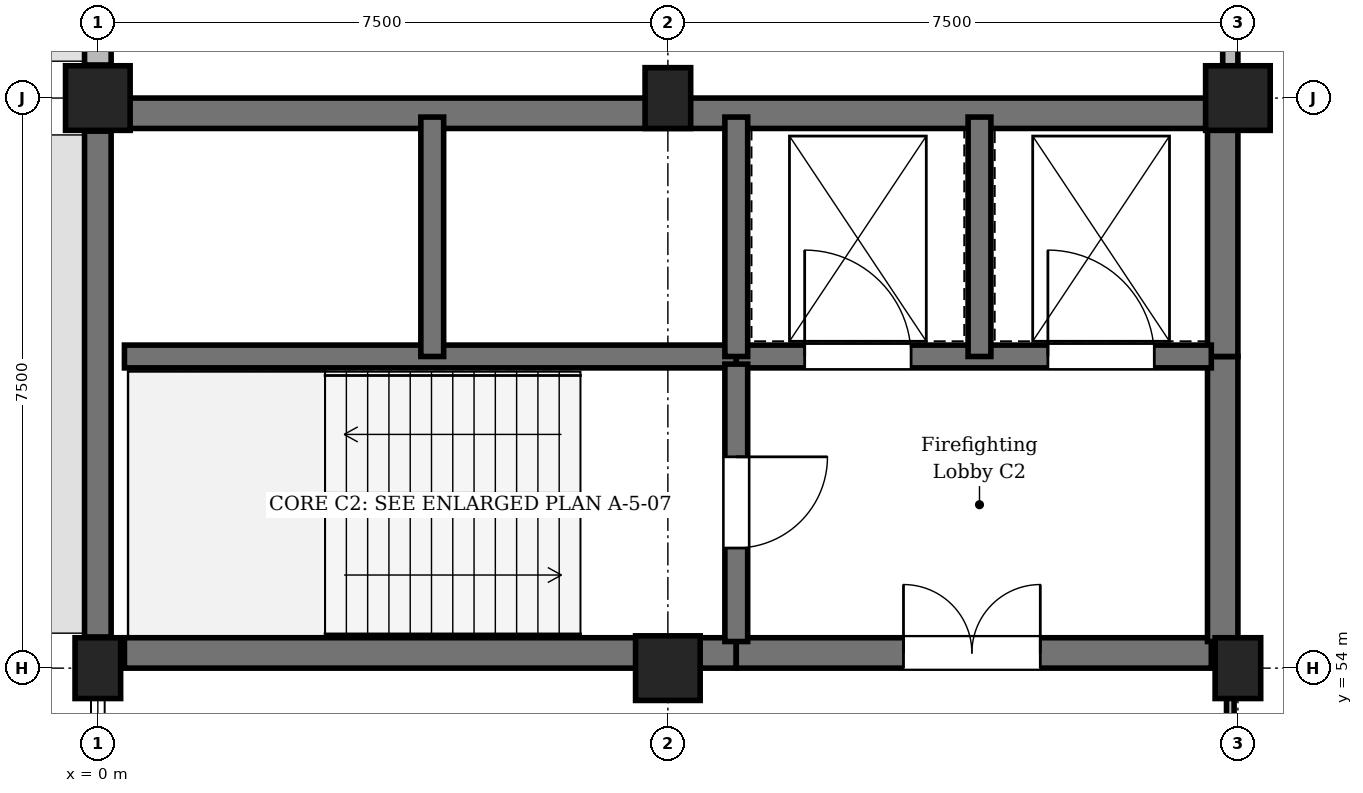
"""IFC4 building model, lengths in metres.
Left out: names, types, materials, properties, quantities, classifications, styles, units other than length and angle.
Written with IfcOpenShell. Run it as: python <this file> out.ifc"""

import sys

from ifc_helpers import new_model, si_unit, direction, frame, frame_2d, origin, origin_2d, place, context, subcontext, project, spatial, rectangle, extrude, element, fill, save


model = new_model("IFC4")
c1 = context("Model", 3, precision=1e-05, world=origin(), true_north=direction((0.0, 1.0)))
c2 = subcontext(c1, "Body", "Model", "MODEL_VIEW")
j1 = project(units=[si_unit("LENGTHUNIT", "METRE"), si_unit("PLANEANGLEUNIT", "RADIAN")], contexts=[c1])
p1 = place(None, origin())
s1 = spatial("IfcSite", under=j1, at=p1, CompositionType="ELEMENT")
p2 = place(p1, origin())
s2 = spatial("IfcBuilding", under=s1, at=p2, CompositionType="ELEMENT")
p3 = place(p2, frame((0.0, 0.0, 4.8)))
s3 = spatial("IfcBuildingStorey", under=s2, at=p3, CompositionType="ELEMENT", Elevation=4.8)
p4 = place(p3, frame((0.0, 54.0, 0.0), z_axis=(0.0, 0.0, 1.0), x_axis=(1.0, 0.0, 0.0)))
e1 = element("IfcColumn", 1, at=p4, inside=s3, PredefinedType="COLUMN", context=c2, shape_type="SweptSolid", body=[
    extrude(rectangle(XDim=0.6, YDim=0.8, at=origin_2d()), origin(), (0.0, 0.0, 1.0), 4.5),
])
for number, where, z_axis, x_axis in (
    (2, (0.0, 61.5, 0.0), (0.0, 0.0, 1.0), (1.0, 0.0, 0.0)),
    (3, (7.5, 54.0, 0.0), (0.0, 0.0, 1.0), (1.0, 0.0, 0.0)),
):
    element("IfcColumn", number, at=place(p3, frame(where, z_axis=z_axis, x_axis=x_axis)), inside=s3, PredefinedType="COLUMN", context=c2, shape_type="SweptSolid", body=[
        extrude(rectangle(XDim=0.85, YDim=0.85, at=origin_2d()), origin(), (0.0, 0.0, 1.0), 4.5),
    ])
for number, where, z_axis, x_axis in (
    (4, (7.5, 61.5, 0.0), (0.0, 0.0, 1.0), (1.0, 0.0, 0.0)),
    (5, (15.0, 54.0, 0.0), (0.0, 0.0, 1.0), (1.0, 0.0, 0.0)),
):
    element("IfcColumn", number, at=place(p3, frame(where, z_axis=z_axis, x_axis=x_axis)), inside=s3, PredefinedType="COLUMN", context=c2, shape_type="SweptSolid", body=[
        extrude(rectangle(XDim=0.6, YDim=0.8, at=origin_2d()), origin(), (0.0, 0.0, 1.0), 4.5),
    ])
p5 = place(p3, frame((15.0, 61.5, 0.0), z_axis=(0.0, 0.0, 1.0), x_axis=(1.0, 0.0, 0.0)))
e6 = element("IfcColumn", 6, at=p5, inside=s3, PredefinedType="COLUMN", context=c2, shape_type="SweptSolid", body=[
    extrude(rectangle(XDim=0.85, YDim=0.85, at=origin_2d()), origin(), (0.0, 0.0, 1.0), 4.5),
])
p6 = place(p3, frame((0.0, 54.41, 0.0), z_axis=(0.0, 0.0, 1.0), x_axis=(0.0, 1.0, 0.0)))
e7 = element("IfcWall", 7, at=p6, inside=s3, PredefinedType="SHEAR", context=c2, shape_type="SweptSolid", body=[
    extrude(rectangle(XDim=6.655, YDim=0.35, at=frame_2d((3.328, 0.0))), origin(), (0.0, 0.0, 1.0), 4.18),
])
p7 = place(p3, frame((0.0, 61.935, 0.0), z_axis=(0.0, 0.0, 1.0), x_axis=(0.0, 1.0, 0.0)))
e8 = element("IfcWall", 8, at=p7, inside=s3, PredefinedType="STANDARD", context=c2, shape_type="SweptSolid", body=[
    extrude(rectangle(XDim=6.655, YDim=0.35, at=frame_2d((3.328, 0.0))), origin(), (0.0, 0.0, 1.0), 3.63),
])
p8 = place(p7, frame((2.327, 0.0, 0.9)))
e9 = element("IfcOpeningElement", 9, at=p8, cuts=e8, PredefinedType="OPENING", context=c2, shape_type="SweptSolid", body=[
    extrude(rectangle(XDim=2.0, YDim=1.95, at=frame_2d((1.0, 0.975))), frame((0.0, 0.185, 0.0), z_axis=(0.0, -1.0, 0.0), x_axis=(1.0, 0.0, 0.0)), (0.0, 0.0, 1.0), 0.37),
])
p9 = place(p3, frame((0.35, 54.2, 0.0), z_axis=(0.0, 0.0, 1.0), x_axis=(1.0, 0.0, 0.0)))
e10 = element("IfcWall", 10, at=p9, inside=s3, PredefinedType="SHEAR", context=c2, shape_type="SweptSolid", body=[
    extrude(rectangle(XDim=8.05, YDim=0.4, at=frame_2d((4.025, 0.0))), origin(), (0.0, 0.0, 1.0), 4.18),
])
p10 = place(p3, frame((8.4, 54.2, 0.0), z_axis=(0.0, 0.0, 1.0), x_axis=(1.0, 0.0, 0.0)))
e11 = element("IfcWall", 11, at=p10, inside=s3, PredefinedType="SHEAR", context=c2, shape_type="SweptSolid", body=[
    extrude(rectangle(XDim=6.25, YDim=0.4, at=frame_2d((3.125, 0.0))), origin(), (0.0, 0.0, 1.0), 4.18),
])
p11 = place(p10, frame((2.2, 0.0, 0.0)))
e12 = element("IfcOpeningElement", 12, at=p11, cuts=e11, PredefinedType="OPENING", context=c2, shape_type="SweptSolid", body=[
    extrude(rectangle(XDim=1.8, YDim=2.25, at=frame_2d((0.9, 1.125))), frame((0.0, 0.21, 0.0), z_axis=(0.0, -1.0, 0.0), x_axis=(1.0, 0.0, 0.0)), (0.0, 0.0, 1.0), 0.42),
])
p12 = place(p3, frame((0.35, 61.3, 0.0), z_axis=(0.0, 0.0, 1.0), x_axis=(1.0, 0.0, 0.0)))
e13 = element("IfcWall", 13, at=p12, inside=s3, PredefinedType="SHEAR", context=c2, shape_type="SweptSolid", body=[
    extrude(rectangle(XDim=14.3, YDim=0.4, at=frame_2d((7.15, 0.0))), origin(), (0.0, 0.0, 1.0), 4.18),
])
p13 = place(p3, frame((14.8, 54.35, 0.0), z_axis=(0.0, 0.0, 1.0), x_axis=(0.0, 1.0, 0.0)))
e14 = element("IfcWall", 14, at=p13, inside=s3, PredefinedType="SHEAR", context=c2, shape_type="SweptSolid", body=[
    extrude(rectangle(XDim=3.75, YDim=0.4, at=frame_2d((1.875, 0.0))), origin(), (0.0, 0.0, 1.0), 4.18),
])
p14 = place(p3, frame((14.8, 58.1, 0.0), z_axis=(0.0, 0.0, 1.0), x_axis=(0.0, 1.0, 0.0)))
e15 = element("IfcWall", 15, at=p14, inside=s3, PredefinedType="SHEAR", context=c2, shape_type="SweptSolid", body=[
    extrude(rectangle(XDim=3.05, YDim=0.4, at=frame_2d((1.525, 0.0))), origin(), (0.0, 0.0, 1.0), 4.18),
])
p15 = place(p3, frame((0.35, 58.1, 0.0), z_axis=(0.0, 0.0, 1.0), x_axis=(1.0, 0.0, 0.0)))
e16 = element("IfcWall", 16, at=p15, inside=s3, PredefinedType="SHEAR", context=c2, shape_type="SweptSolid", body=[
    extrude(rectangle(XDim=8.05, YDim=0.3, at=frame_2d((4.025, 0.0))), origin(), (0.0, 0.0, 1.0), 4.18),
])
p16 = place(p3, frame((8.4, 58.1, 0.0), z_axis=(0.0, 0.0, 1.0), x_axis=(1.0, 0.0, 0.0)))
e17 = element("IfcWall", 17, at=p16, inside=s3, PredefinedType="SHEAR", context=c2, shape_type="SweptSolid", body=[
    extrude(rectangle(XDim=6.25, YDim=0.3, at=frame_2d((3.125, 0.0))), origin(), (0.0, 0.0, 1.0), 4.18),
])
p17 = place(p16, frame((0.9, 0.0, 0.0)))
e18 = element("IfcOpeningElement", 18, at=p17, cuts=e17, PredefinedType="OPENING", context=c2, shape_type="SweptSolid", body=[
    extrude(rectangle(XDim=1.4, YDim=2.25, at=frame_2d((0.7, 1.125))), frame((0.0, 0.16, 0.0), z_axis=(0.0, -1.0, 0.0), x_axis=(1.0, 0.0, 0.0)), (0.0, 0.0, 1.0), 0.32),
])
p18 = place(p16, frame((4.1, 0.0, 0.0)))
e19 = element("IfcOpeningElement", 19, at=p18, cuts=e17, PredefinedType="OPENING", context=c2, shape_type="SweptSolid", body=[
    extrude(rectangle(XDim=1.4, YDim=2.25, at=frame_2d((0.7, 1.125))), frame((0.0, 0.16, 0.0), z_axis=(0.0, -1.0, 0.0), x_axis=(1.0, 0.0, 0.0)), (0.0, 0.0, 1.0), 0.32),
])
p19 = place(p3, frame((8.4, 58.0, 0.0), z_axis=(0.0, 0.0, 1.0), x_axis=(0.0, -1.0, 0.0)))
e20 = element("IfcWall", 20, at=p19, inside=s3, PredefinedType="SHEAR", context=c2, shape_type="SweptSolid", body=[
    extrude(rectangle(XDim=3.65, YDim=0.3, at=frame_2d((1.825, 0.0))), origin(), (0.0, 0.0, 1.0), 4.18),
])
p20 = place(p19, frame((1.22, 0.0, 0.0)))
e21 = element("IfcOpeningElement", 21, at=p20, cuts=e20, PredefinedType="OPENING", context=c2, shape_type="SweptSolid", body=[
    extrude(rectangle(XDim=1.2, YDim=2.25, at=frame_2d((0.6, 1.125))), frame((0.0, 0.16, 0.0), z_axis=(0.0, -1.0, 0.0), x_axis=(1.0, 0.0, 0.0)), (0.0, 0.0, 1.0), 0.32),
])
for number, where, z_axis, x_axis in (
    (22, (4.4, 58.1, 0.0), (0.0, 0.0, 1.0), (0.0, 1.0, 0.0)),
    (23, (8.4, 58.1, 0.0), (0.0, 0.0, 1.0), (0.0, 1.0, 0.0)),
    (24, (11.6, 58.1, 0.0), (0.0, 0.0, 1.0), (0.0, 1.0, 0.0)),
):
    element("IfcWall", number, at=place(p3, frame(where, z_axis=z_axis, x_axis=x_axis)), inside=s3, PredefinedType="SHEAR", context=c2, shape_type="SweptSolid", body=[
        extrude(rectangle(XDim=3.15, YDim=0.3, at=frame_2d((1.575, 0.0))), origin(), (0.0, 0.0, 1.0), 4.18),
    ])
p21 = place(p3, frame((14.9, 34.8, 0.0), z_axis=(0.0, 0.0, 1.0), x_axis=(0.0, 1.0, 0.0)))
e25 = element("IfcWall", 25, at=p21, inside=s3, PredefinedType="PARTITIONING", context=c2, shape_type="SweptSolid", body=[
    extrude(rectangle(XDim=18.9, YDim=0.1, at=frame_2d((9.45, 0.0))), origin(), (0.0, 0.0, 1.0), 3.565),
])
p22 = place(p21, frame((7.19, 0.0, 0.0)))
e26 = element("IfcOpeningElement", 26, at=p22, cuts=e25, PredefinedType="OPENING", context=c2, shape_type="SweptSolid", body=[
    extrude(rectangle(XDim=1.05, YDim=2.2, at=frame_2d((0.525, 1.1))), frame((0.0, 0.06, 0.0), z_axis=(0.0, -1.0, 0.0), x_axis=(1.0, 0.0, 0.0)), (0.0, 0.0, 1.0), 0.12),
])
p23 = place(p3, frame((14.9, 61.8, 0.0), z_axis=(0.0, 0.0, 1.0), x_axis=(0.0, 1.0, 0.0)))
e27 = element("IfcWall", 27, at=p23, inside=s3, PredefinedType="STANDARD", context=c2, shape_type="SweptSolid", body=[
    extrude(rectangle(XDim=20.2, YDim=0.2, at=frame_2d((10.1, 0.0))), origin(), (0.0, 0.0, 1.0), 3.465),
])
p24 = place(p23, frame((18.9, 0.0, 0.0)))
e28 = element("IfcOpeningElement", 28, at=p24, cuts=e27, PredefinedType="OPENING", context=c2, shape_type="SweptSolid", body=[
    extrude(rectangle(XDim=1.05, YDim=2.2, at=frame_2d((0.525, 1.1))), frame((0.0, 0.11, 0.0), z_axis=(0.0, -1.0, 0.0), x_axis=(1.0, 0.0, 0.0)), (0.0, 0.0, 1.0), 0.22),
])
p25 = place(p11, origin())
e29 = element("IfcDoor", 29, at=p25, inside=s3, OperationType="DOUBLE_DOOR_SINGLE_SWING", PredefinedType="DOOR", context=c2, shape_type="SweptSolid", body=[
    extrude(rectangle(XDim=1.8, YDim=2.25, at=frame_2d((0.9, 1.125))), frame((0.0, 0.025, 0.0), z_axis=(0.0, -1.0, 0.0), x_axis=(1.0, 0.0, 0.0)), (0.0, 0.0, 1.0), 0.05),
])
fill(e12, e29)
p26 = place(p17, origin())
e30 = element("IfcDoor", 30, at=p26, inside=s3, OperationType="DOUBLE_DOOR_SLIDING", PredefinedType="DOOR", context=c2, shape_type="SweptSolid", body=[
    extrude(rectangle(XDim=1.4, YDim=2.25, at=frame_2d((0.7, 1.125))), frame((0.0, 0.025, 0.0), z_axis=(0.0, -1.0, 0.0), x_axis=(1.0, 0.0, 0.0)), (0.0, 0.0, 1.0), 0.05),
])
fill(e18, e30)
p27 = place(p18, origin())
e31 = element("IfcDoor", 31, at=p27, inside=s3, OperationType="DOUBLE_DOOR_SLIDING", PredefinedType="DOOR", context=c2, shape_type="SweptSolid", body=[
    extrude(rectangle(XDim=1.4, YDim=2.25, at=frame_2d((0.7, 1.125))), frame((0.0, 0.025, 0.0), z_axis=(0.0, -1.0, 0.0), x_axis=(1.0, 0.0, 0.0)), (0.0, 0.0, 1.0), 0.05),
])
fill(e19, e31)
p28 = place(p20, origin())
e32 = element("IfcDoor", 32, at=p28, inside=s3, OperationType="SINGLE_SWING_LEFT", PredefinedType="DOOR", context=c2, shape_type="SweptSolid", body=[
    extrude(rectangle(XDim=1.2, YDim=2.25, at=frame_2d((0.6, 1.125))), frame((0.0, 0.025, 0.0), z_axis=(0.0, -1.0, 0.0), x_axis=(1.0, 0.0, 0.0)), (0.0, 0.0, 1.0), 0.05),
])
fill(e21, e32)
save(model, sys.argv[1])
